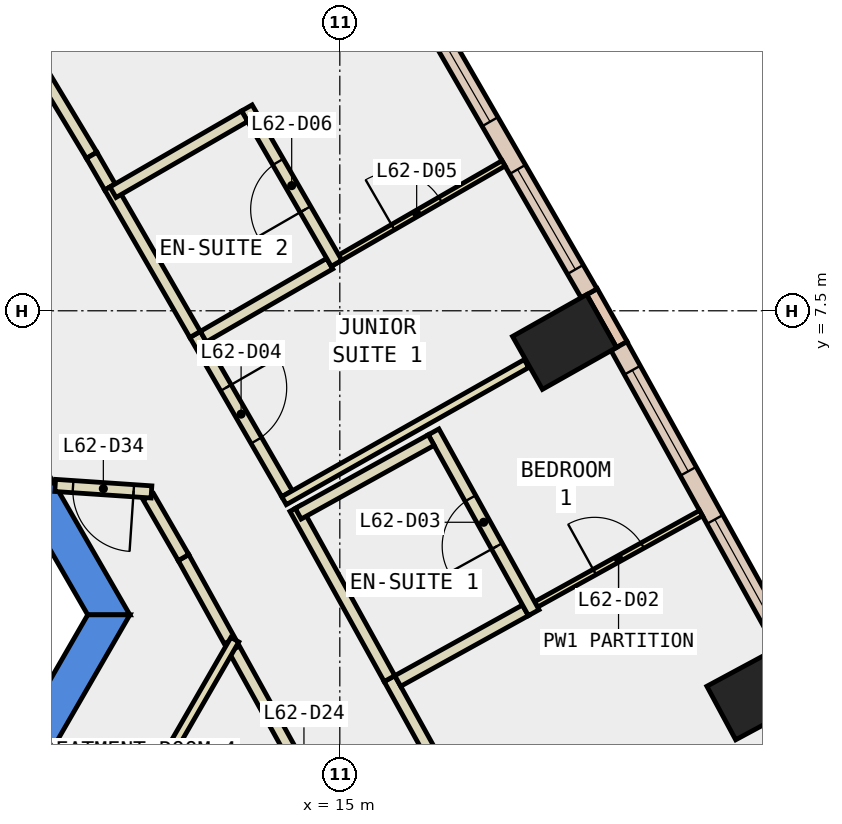
"""IFC4 building model, lengths in metres.
Left out: names, types, materials, properties, quantities, classifications, styles, units other than length and angle.
Written with IfcOpenShell. Run it as: python <this file> out.ifc"""

import sys

from ifc_helpers import new_model, si_unit, direction, frame, frame_2d, origin, origin_2d, place, context, subcontext, project, spatial, polyline, rectangle, outline, extrude, element, fill, save


model = new_model("IFC4")
c1 = context("Model", 3, precision=1e-05, world=origin(), true_north=direction((0.0, 1.0)))
c2 = subcontext(c1, "Body", "Model", "MODEL_VIEW")
j1 = project(units=[si_unit("LENGTHUNIT", "METRE"), si_unit("PLANEANGLEUNIT", "RADIAN")], contexts=[c1])
p1 = place(None, origin())
s1 = spatial("IfcSite", under=j1, at=p1, CompositionType="ELEMENT")
p2 = place(p1, origin())
s2 = spatial("IfcBuilding", under=s1, at=p2, CompositionType="ELEMENT")
p3 = place(p2, frame((0.0, 0.0, 270.2)))
s3 = spatial("IfcBuildingStorey", under=s2, at=p3, CompositionType="ELEMENT", Elevation=270.2)
for number, where, z_axis, x_axis in (
    (1, (21.89, 1.217, -0.34), (0.0, 0.0, 1.0), (-0.474, 0.881, 0.0)),
    (2, (18.696, 6.987, -0.34), (0.0, 0.0, 1.0), (-0.491, 0.871, 0.0)),
):
    element("IfcColumn", number, at=place(p3, frame(where, z_axis=z_axis, x_axis=x_axis)), inside=s3, PredefinedType="COLUMN", context=c2, shape_type="SweptSolid", body=[
        extrude(rectangle(XDim=1.0, YDim=1.4, at=origin_2d()), origin(), (0.0, 0.0, 1.0), 3.6),
    ])
p4 = place(p3, frame((0.0, 0.0, -0.34)))
e3 = element("IfcWall", 3, at=p4, inside=s3, PredefinedType="SHEAR", context=c2, shape_type="SweptSolid", body=[
    extrude(outline(polyline([(6.786, 10.747), (6.266, 10.447), (10.854, 2.5), (11.547, 2.5), (6.786, 10.747)])), origin(), (0.0, 0.0, 1.0), 3.6),
])
p5 = place(p3, frame((0.0, 0.0, -0.34)))
e4 = element("IfcWall", 4, at=p5, inside=s3, PredefinedType="SHEAR", context=c2, shape_type="SweptSolid", body=[
    extrude(outline(polyline([(5.774, -7.5), (11.547, 2.5), (10.854, 2.5), (5.427, -6.9), (5.774, -7.5)])), origin(), (0.0, 0.0, 1.0), 3.6),
])
p6 = place(p3, frame((19.639, 6.944, 0.0), z_axis=(0.0, 0.0, 1.0), x_axis=(-0.491848119507, 0.870681013539, 0.0)))
e5 = element("IfcWall", 5, at=p6, inside=s3, PredefinedType="STANDARD", context=c2, shape_type="SweptSolid", body=[
    extrude(rectangle(XDim=1.0, YDim=0.2, at=frame_2d((0.5, 0.0))), origin(), (0.0, 0.0, 1.0), 3.26),
])
p7 = place(p3, frame((22.308, 2.01, 0.0), z_axis=(0.0, 0.0, 1.0), x_axis=(-0.484260568952, 0.874923826032, 0.0)))
e6 = element("IfcWall", 6, at=p7, inside=s3, PredefinedType="STANDARD", context=c2, shape_type="SweptSolid", body=[
    extrude(rectangle(XDim=5.611, YDim=0.3, at=frame_2d((2.805, 0.0))), origin(), (0.0, 0.0, 1.0), 3.26),
])
p8 = place(p7, frame((0.453, 0.0, 0.9)))
e7 = element("IfcOpeningElement", 7, at=p8, cuts=e6, PredefinedType="OPENING", context=c2, shape_type="SweptSolid", body=[
    extrude(rectangle(XDim=1.9, YDim=2.0, at=frame_2d((0.95, 1.0))), frame((0.0, 0.16, 0.0), z_axis=(0.0, -1.0, 0.0), x_axis=(1.0, 0.0, 0.0)), (0.0, 0.0, 1.0), 0.32),
])
p9 = place(p7, frame((3.258, 0.0, 0.9)))
e8 = element("IfcOpeningElement", 8, at=p9, cuts=e6, PredefinedType="OPENING", context=c2, shape_type="SweptSolid", body=[
    extrude(rectangle(XDim=1.9, YDim=2.0, at=frame_2d((0.95, 1.0))), frame((0.0, 0.16, 0.0), z_axis=(0.0, -1.0, 0.0), x_axis=(1.0, 0.0, 0.0)), (0.0, 0.0, 1.0), 0.32),
])
p10 = place(p3, frame((19.1, 7.787, 0.0), z_axis=(0.0, 0.0, 1.0), x_axis=(-0.500041292042, 0.866001562501, 0.0)))
e9 = element("IfcWall", 9, at=p10, inside=s3, PredefinedType="STANDARD", context=c2, shape_type="SweptSolid", body=[
    extrude(rectangle(XDim=5.612, YDim=0.3, at=frame_2d((2.806, 0.0))), origin(), (0.0, 0.0, 1.0), 3.26),
])
p11 = place(p10, frame((0.453, 0.0, 0.9)))
e10 = element("IfcOpeningElement", 10, at=p11, cuts=e9, PredefinedType="OPENING", context=c2, shape_type="SweptSolid", body=[
    extrude(rectangle(XDim=1.9, YDim=2.0, at=frame_2d((0.95, 1.0))), frame((0.0, 0.16, 0.0), z_axis=(0.0, -1.0, 0.0), x_axis=(1.0, 0.0, 0.0)), (0.0, 0.0, 1.0), 0.32),
])
p12 = place(p10, frame((3.259, 0.0, 0.9)))
e11 = element("IfcOpeningElement", 11, at=p12, cuts=e9, PredefinedType="OPENING", context=c2, shape_type="SweptSolid", body=[
    extrude(rectangle(XDim=1.9, YDim=2.0, at=frame_2d((0.95, 1.0))), frame((0.0, 0.16, 0.0), z_axis=(0.0, -1.0, 0.0), x_axis=(1.0, 0.0, 0.0)), (0.0, 0.0, 1.0), 0.32),
])
p13 = place(p3, frame((13.188, 2.071, 0.0), z_axis=(0.0, 0.0, 1.0), x_axis=(-0.484398936474, 0.874847226859, 0.0)))
e12 = element("IfcWall", 12, at=p13, inside=s3, PredefinedType="PARTITIONING", context=c2, shape_type="SweptSolid", body=[
    extrude(rectangle(XDim=1.567, YDim=0.2, at=frame_2d((0.783, 0.0))), origin(), (0.0, 0.0, 1.0), 3.26),
])
p14 = place(p3, frame((12.429, 3.442, 0.0), z_axis=(0.0, 0.0, 1.0), x_axis=(-0.500076612374, 0.865981167091, 0.0)))
e13 = element("IfcWall", 13, at=p14, inside=s3, PredefinedType="PARTITIONING", context=c2, shape_type="SweptSolid", body=[
    extrude(rectangle(XDim=1.154, YDim=0.2, at=frame_2d((0.577, 0.0))), origin(), (0.0, 0.0, 1.0), 3.26),
])
p15 = place(p3, frame((11.902, 4.521, 0.0), z_axis=(0.0, 0.0, 1.0), x_axis=(-0.997726217037, 0.067397298437, 0.0)))
e14 = element("IfcWall", 14, at=p15, inside=s3, PredefinedType="PARTITIONING", context=c2, shape_type="SweptSolid", body=[
    extrude(rectangle(XDim=1.587, YDim=0.2, at=frame_2d((0.793, 0.0))), origin(), (0.0, 0.0, 1.0), 3.26),
])
p16 = place(p15, frame((0.293, 0.0, 0.0)))
e15 = element("IfcOpeningElement", 15, at=p16, cuts=e14, PredefinedType="OPENING", context=c2, shape_type="SweptSolid", body=[
    extrude(rectangle(XDim=1.0, YDim=2.1, at=frame_2d((0.5, 1.05))), frame((0.0, 0.11, 0.0), z_axis=(0.0, -1.0, 0.0), x_axis=(1.0, 0.0, 0.0)), (0.0, 0.0, 1.0), 0.22),
])
p17 = place(p3, frame((15.56, -2.214, 0.0), z_axis=(0.0, 0.0, 1.0), x_axis=(-0.484323615817, 0.874888927329, 0.0)))
e16 = element("IfcWall", 16, at=p17, inside=s3, PredefinedType="PARTITIONING", context=c2, shape_type="SweptSolid", body=[
    extrude(rectangle(XDim=4.747, YDim=0.2, at=frame_2d((2.374, 0.0))), origin(), (0.0, 0.0, 1.0), 3.26),
])
p18 = place(p17, frame((1.874, 0.0, 0.0)))
e17 = element("IfcOpeningElement", 17, at=p18, cuts=e16, PredefinedType="OPENING", context=c2, shape_type="SweptSolid", body=[
    extrude(rectangle(XDim=1.0, YDim=2.1, at=frame_2d((0.5, 1.05))), frame((0.0, 0.11, 0.0), z_axis=(0.0, -1.0, 0.0), x_axis=(1.0, 0.0, 0.0)), (0.0, 0.0, 1.0), 0.22),
])
p19 = place(p3, frame((15.817, 1.451, 0.0), z_axis=(0.0, 0.0, 1.0), x_axis=(0.48417811398, -0.874969458863, 0.0)))
e18 = element("IfcWall", 18, at=p19, inside=s3, PredefinedType="PARTITIONING", context=c2, shape_type="SweptSolid", body=[
    extrude(rectangle(XDim=3.101, YDim=0.2, at=frame_2d((1.55, 0.0))), origin(), (0.0, 0.0, 1.0), 3.26),
])
p20 = place(p3, frame((14.267, 4.25, 0.0), z_axis=(0.0, 0.0, 1.0), x_axis=(0.4843920198, -0.874851056554, 0.0)))
e19 = element("IfcWall", 19, at=p20, inside=s3, PredefinedType="PARTITIONING", context=c2, shape_type="SweptSolid", body=[
    extrude(rectangle(XDim=3.199, YDim=0.2, at=frame_2d((1.6, 0.0))), origin(), (0.0, 0.0, 1.0), 3.26),
])
p21 = place(p3, frame((12.62, 7.111, 0.0), z_axis=(0.0, 0.0, 1.0), x_axis=(0.499950733426, -0.866053845986, 0.0)))
e20 = element("IfcWall", 20, at=p21, inside=s3, PredefinedType="PARTITIONING", context=c2, shape_type="SweptSolid", body=[
    extrude(rectangle(XDim=3.024, YDim=0.2, at=frame_2d((1.512, 0.0))), origin(), (0.0, 0.0, 1.0), 3.26),
])
p22 = place(p21, frame((1.013, 0.0, 0.0)))
e21 = element("IfcOpeningElement", 21, at=p22, cuts=e20, PredefinedType="OPENING", context=c2, shape_type="SweptSolid", body=[
    extrude(rectangle(XDim=1.0, YDim=2.1, at=frame_2d((0.5, 1.05))), frame((0.0, 0.11, 0.0), z_axis=(0.0, -1.0, 0.0), x_axis=(1.0, 0.0, 0.0)), (0.0, 0.0, 1.0), 0.22),
])
p23 = place(p3, frame((9.281, 12.779, 0.0), z_axis=(0.0, 0.0, 1.0), x_axis=(0.515568955032, -0.856848091908, 0.0)))
e22 = element("IfcWall", 22, at=p23, inside=s3, PredefinedType="PARTITIONING", context=c2, shape_type="SweptSolid", body=[
    extrude(rectangle(XDim=3.177, YDim=0.2, at=frame_2d((1.588, 0.0))), origin(), (0.0, 0.0, 1.0), 3.26),
])
p24 = place(p3, frame((10.919, 10.057, 0.0), z_axis=(0.0, 0.0, 1.0), x_axis=(0.500284357783, -0.865861167485, 0.0)))
e23 = element("IfcWall", 23, at=p24, inside=s3, PredefinedType="PARTITIONING", context=c2, shape_type="SweptSolid", body=[
    extrude(rectangle(XDim=0.602, YDim=0.2, at=frame_2d((0.301, 0.0))), origin(), (0.0, 0.0, 1.0), 3.26),
])
p25 = place(p3, frame((11.22, 9.536, 0.0), z_axis=(0.0, 0.0, 1.0), x_axis=(0.500049511043, -0.865996816683, 0.0)))
e24 = element("IfcWall", 24, at=p25, inside=s3, PredefinedType="PARTITIONING", context=c2, shape_type="SweptSolid", body=[
    extrude(rectangle(XDim=2.8, YDim=0.2, at=frame_2d((1.4, 0.0))), origin(), (0.0, 0.0, 1.0), 3.26),
])
p26 = place(p3, frame((18.228, 2.671, 0.0), z_axis=(0.0, 0.0, 1.0), x_axis=(0.874895591854, 0.484311576729, 0.0)))
e25 = element("IfcWall", 25, at=p26, inside=s3, PredefinedType="PARTITIONING", context=c2, shape_type="SweptSolid", body=[
    extrude(rectangle(XDim=3.1, YDim=0.1, at=frame_2d((1.55, 0.0))), origin(), (0.0, 0.0, 1.0), 3.26),
])
p27 = place(p26, frame((1.1, 0.0, 0.0)))
e26 = element("IfcOpeningElement", 26, at=p27, cuts=e25, PredefinedType="OPENING", context=c2, shape_type="SweptSolid", body=[
    extrude(rectangle(XDim=0.9, YDim=2.1, at=frame_2d((0.45, 1.05))), frame((0.0, 0.06, 0.0), z_axis=(0.0, -1.0, 0.0), x_axis=(1.0, 0.0, 0.0)), (0.0, 0.0, 1.0), 0.12),
])
p28 = place(p3, frame((15.953, 1.412, 0.0), z_axis=(0.0, 0.0, 1.0), x_axis=(0.875014790305, 0.484096185429, 0.0)))
e27 = element("IfcWall", 27, at=p28, inside=s3, PredefinedType="PARTITIONING", context=c2, shape_type="SweptSolid", body=[
    extrude(rectangle(XDim=2.4, YDim=0.2, at=frame_2d((1.2, 0.0))), origin(), (0.0, 0.0, 1.0), 3.26),
])
p29 = place(p3, frame((18.189, 2.535, 0.0), z_axis=(0.0, 0.0, 1.0), x_axis=(-0.484447408253, 0.874820386501, 0.0)))
e28 = element("IfcWall", 28, at=p29, inside=s3, PredefinedType="PARTITIONING", context=c2, shape_type="SweptSolid", body=[
    extrude(rectangle(XDim=3.4, YDim=0.2, at=frame_2d((1.7, 0.0))), origin(), (0.0, 0.0, 1.0), 3.26),
])
p30 = place(p29, frame((1.25, 0.0, 0.0)))
e29 = element("IfcOpeningElement", 29, at=p30, cuts=e28, PredefinedType="OPENING", context=c2, shape_type="SweptSolid", body=[
    extrude(rectangle(XDim=0.9, YDim=2.1, at=frame_2d((0.45, 1.05))), frame((0.0, 0.11, 0.0), z_axis=(0.0, -1.0, 0.0), x_axis=(1.0, 0.0, 0.0)), (0.0, 0.0, 1.0), 0.22),
])
p31 = place(p3, frame((16.503, 5.374, 0.0), z_axis=(0.0, 0.0, 1.0), x_axis=(-0.874847389013, -0.484398643615, 0.0)))
e30 = element("IfcWall", 30, at=p31, inside=s3, PredefinedType="PARTITIONING", context=c2, shape_type="SweptSolid", body=[
    extrude(rectangle(XDim=2.5, YDim=0.2, at=frame_2d((1.25, 0.0))), origin(), (0.0, 0.0, 1.0), 3.26),
])
p32 = place(p3, frame((14.083, 4.377, 0.0), z_axis=(0.0, 0.0, 1.0), x_axis=(0.870415885751, 0.492317159799, 0.0)))
e31 = element("IfcWall", 31, at=p32, inside=s3, PredefinedType="PARTITIONING", context=c2, shape_type="SweptSolid", body=[
    extrude(rectangle(XDim=4.581, YDim=0.15, at=frame_2d((2.29, 0.0))), origin(), (0.0, 0.0, 1.0), 3.26),
])
p33 = place(p3, frame((14.835, 8.275, 0.0), z_axis=(0.0, 0.0, 1.0), x_axis=(0.8660266723, 0.49999780286, 0.0)))
e32 = element("IfcWall", 32, at=p33, inside=s3, PredefinedType="PARTITIONING", context=c2, shape_type="SweptSolid", body=[
    extrude(rectangle(XDim=3.3, YDim=0.1, at=frame_2d((1.65, 0.0))), origin(), (0.0, 0.0, 1.0), 3.26),
])
p34 = place(p33, frame((1.2, 0.0, 0.0)))
e33 = element("IfcOpeningElement", 33, at=p34, cuts=e32, PredefinedType="OPENING", context=c2, shape_type="SweptSolid", body=[
    extrude(rectangle(XDim=0.9, YDim=2.1, at=frame_2d((0.45, 1.05))), frame((0.0, 0.06, 0.0), z_axis=(0.0, -1.0, 0.0), x_axis=(1.0, 0.0, 0.0)), (0.0, 0.0, 1.0), 0.12),
])
p35 = place(p3, frame((12.756, 7.075, 0.0), z_axis=(0.0, 0.0, 1.0), x_axis=(0.866075499611, 0.499913221443, 0.0)))
e34 = element("IfcWall", 34, at=p35, inside=s3, PredefinedType="PARTITIONING", context=c2, shape_type="SweptSolid", body=[
    extrude(rectangle(XDim=2.4, YDim=0.2, at=frame_2d((1.2, 0.0))), origin(), (0.0, 0.0, 1.0), 3.26),
])
p36 = place(p3, frame((14.946, 8.281, 0.0), z_axis=(0.0, 0.0, 1.0), x_axis=(-0.500001826776, 0.866024349092, 0.0)))
e35 = element("IfcWall", 35, at=p36, inside=s3, PredefinedType="PARTITIONING", context=c2, shape_type="SweptSolid", body=[
    extrude(rectangle(XDim=2.95, YDim=0.2, at=frame_2d((1.475, 0.0))), origin(), (0.0, 0.0, 1.0), 3.26),
])
p37 = place(p36, frame((1.025, 0.0, 0.0)))
e36 = element("IfcOpeningElement", 36, at=p37, cuts=e35, PredefinedType="OPENING", context=c2, shape_type="SweptSolid", body=[
    extrude(rectangle(XDim=0.9, YDim=2.1, at=frame_2d((0.45, 1.05))), frame((0.0, 0.11, 0.0), z_axis=(0.0, -1.0, 0.0), x_axis=(1.0, 0.0, 0.0)), (0.0, 0.0, 1.0), 0.22),
])
p38 = place(p3, frame((13.435, 10.7, 0.0), z_axis=(0.0, 0.0, 1.0), x_axis=(-0.866022959057, -0.500004234368, 0.0)))
e37 = element("IfcWall", 37, at=p38, inside=s3, PredefinedType="PARTITIONING", context=c2, shape_type="SweptSolid", body=[
    extrude(rectangle(XDim=2.5, YDim=0.2, at=frame_2d((1.25, 0.0))), origin(), (0.0, 0.0, 1.0), 3.26),
])
p39 = place(p3, frame((9.25, -4.878, 0.0), z_axis=(0.0, 0.0, 1.0), x_axis=(0.499982416899, 0.866035555154, 0.0)))
e38 = element("IfcWall", 38, at=p39, inside=s3, PredefinedType="PARTITIONING", context=c2, shape_type="SweptSolid", body=[
    extrude(rectangle(XDim=8.048, YDim=0.15, at=frame_2d((4.024, 0.0))), origin(), (0.0, 0.0, 1.0), 3.26),
])
p40 = place(p8, origin())
e39 = element("IfcWindow", 39, at=p40, inside=s3, PartitioningType="SINGLE_PANEL", PredefinedType="WINDOW", context=c2, shape_type="SweptSolid", body=[
    extrude(rectangle(XDim=1.9, YDim=2.0, at=frame_2d((0.95, 1.0))), frame((0.0, 0.03, 0.0), z_axis=(0.0, -1.0, 0.0), x_axis=(1.0, 0.0, 0.0)), (0.0, 0.0, 1.0), 0.06),
])
fill(e7, e39)
p41 = place(p9, origin())
e40 = element("IfcWindow", 40, at=p41, inside=s3, PartitioningType="SINGLE_PANEL", PredefinedType="WINDOW", context=c2, shape_type="SweptSolid", body=[
    extrude(rectangle(XDim=1.9, YDim=2.0, at=frame_2d((0.95, 1.0))), frame((0.0, 0.03, 0.0), z_axis=(0.0, -1.0, 0.0), x_axis=(1.0, 0.0, 0.0)), (0.0, 0.0, 1.0), 0.06),
])
fill(e8, e40)
p42 = place(p11, origin())
e41 = element("IfcWindow", 41, at=p42, inside=s3, PartitioningType="SINGLE_PANEL", PredefinedType="WINDOW", context=c2, shape_type="SweptSolid", body=[
    extrude(rectangle(XDim=1.9, YDim=2.0, at=frame_2d((0.95, 1.0))), frame((0.0, 0.03, 0.0), z_axis=(0.0, -1.0, 0.0), x_axis=(1.0, 0.0, 0.0)), (0.0, 0.0, 1.0), 0.06),
])
fill(e10, e41)
p43 = place(p12, origin())
e42 = element("IfcWindow", 42, at=p43, inside=s3, PartitioningType="SINGLE_PANEL", PredefinedType="WINDOW", context=c2, shape_type="SweptSolid", body=[
    extrude(rectangle(XDim=1.9, YDim=2.0, at=frame_2d((0.95, 1.0))), frame((0.0, 0.03, 0.0), z_axis=(0.0, -1.0, 0.0), x_axis=(1.0, 0.0, 0.0)), (0.0, 0.0, 1.0), 0.06),
])
fill(e11, e42)
p44 = place(p27, origin())
e43 = element("IfcDoor", 43, at=p44, inside=s3, OperationType="SINGLE_SWING_RIGHT", PredefinedType="DOOR", context=c2, shape_type="SweptSolid", body=[
    extrude(rectangle(XDim=0.9, YDim=2.1, at=frame_2d((0.45, 1.05))), frame((0.0, 0.025, 0.0), z_axis=(0.0, -1.0, 0.0), x_axis=(1.0, 0.0, 0.0)), (0.0, 0.0, 1.0), 0.05),
])
fill(e26, e43)
p45 = place(p30, origin())
e44 = element("IfcDoor", 44, at=p45, inside=s3, OperationType="SINGLE_SWING_LEFT", PredefinedType="DOOR", context=c2, shape_type="SweptSolid", body=[
    extrude(rectangle(XDim=0.9, YDim=2.1, at=frame_2d((0.45, 1.05))), frame((0.0, 0.025, 0.0), z_axis=(0.0, -1.0, 0.0), x_axis=(1.0, 0.0, 0.0)), (0.0, 0.0, 1.0), 0.05),
])
fill(e29, e44)
p46 = place(p22, origin())
e45 = element("IfcDoor", 45, at=p46, inside=s3, OperationType="SINGLE_SWING_LEFT", PredefinedType="DOOR", context=c2, shape_type="SweptSolid", body=[
    extrude(rectangle(XDim=1.0, YDim=2.1, at=frame_2d((0.5, 1.05))), frame((0.0, 0.025, 0.0), z_axis=(0.0, -1.0, 0.0), x_axis=(1.0, 0.0, 0.0)), (0.0, 0.0, 1.0), 0.05),
])
fill(e21, e45)
p47 = place(p34, origin())
e46 = element("IfcDoor", 46, at=p47, inside=s3, OperationType="SINGLE_SWING_RIGHT", PredefinedType="DOOR", context=c2, shape_type="SweptSolid", body=[
    extrude(rectangle(XDim=0.9, YDim=2.1, at=frame_2d((0.45, 1.05))), frame((0.0, 0.025, 0.0), z_axis=(0.0, -1.0, 0.0), x_axis=(1.0, 0.0, 0.0)), (0.0, 0.0, 1.0), 0.05),
])
fill(e33, e46)
p48 = place(p37, origin())
e47 = element("IfcDoor", 47, at=p48, inside=s3, OperationType="SINGLE_SWING_LEFT", PredefinedType="DOOR", context=c2, shape_type="SweptSolid", body=[
    extrude(rectangle(XDim=0.9, YDim=2.1, at=frame_2d((0.45, 1.05))), frame((0.0, 0.025, 0.0), z_axis=(0.0, -1.0, 0.0), x_axis=(1.0, 0.0, 0.0)), (0.0, 0.0, 1.0), 0.05),
])
fill(e36, e47)
p49 = place(p16, origin())
e48 = element("IfcDoor", 48, at=p49, inside=s3, OperationType="SINGLE_SWING_LEFT", PredefinedType="DOOR", context=c2, shape_type="SweptSolid", body=[
    extrude(rectangle(XDim=1.0, YDim=2.1, at=frame_2d((0.5, 1.05))), frame((0.0, 0.025, 0.0), z_axis=(0.0, -1.0, 0.0), x_axis=(1.0, 0.0, 0.0)), (0.0, 0.0, 1.0), 0.05),
])
fill(e15, e48)
save(model, sys.argv[1])
